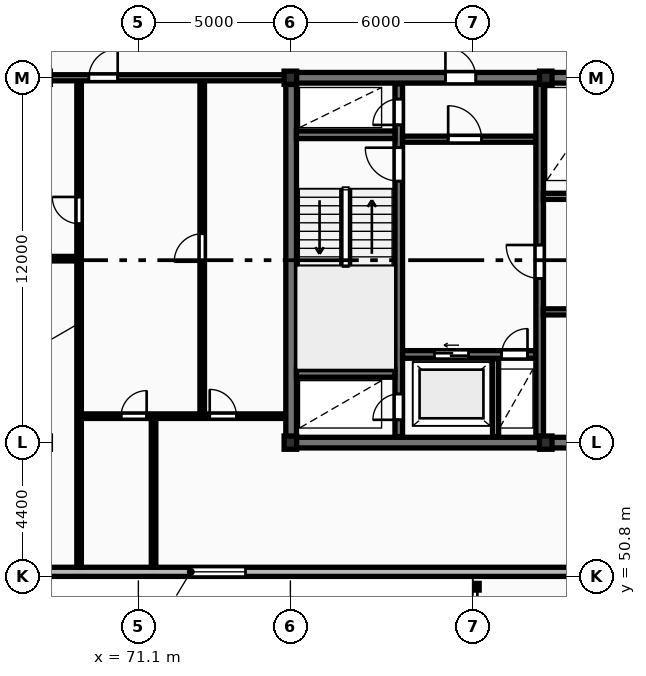
"""IFC4 building model, lengths in metres.
Left out: names, types, materials, properties, quantities, classifications, styles, units other than length and angle.
Written with IfcOpenShell. Run it as: python <this file> out.ifc"""

import sys

from ifc_helpers import new_model, si_unit, direction, frame, frame_2d, origin, origin_2d, place, context, subcontext, project, spatial, rectangle, i_section, extrude, element, fill, save


model = new_model("IFC4")
c1 = context("Model", 3, precision=1e-05, world=origin(), true_north=direction((0.0, 1.0)))
c2 = subcontext(c1, "Body", "Model", "MODEL_VIEW")
j1 = project(units=[si_unit("LENGTHUNIT", "METRE"), si_unit("PLANEANGLEUNIT", "RADIAN")], contexts=[c1])
p1 = place(None, origin())
s1 = spatial("IfcSite", under=j1, at=p1, CompositionType="ELEMENT")
p2 = place(p1, origin())
s2 = spatial("IfcBuilding", under=s1, at=p2, CompositionType="ELEMENT")
p3 = place(p2, frame((0.0, 0.0, 146.5)))
s3 = spatial("IfcBuildingStorey", under=s2, at=p3, CompositionType="ELEMENT", Elevation=146.5)
for number, where, z_axis, x_axis in (
    (1, (76.1, 55.2, 0.0), (0.0, 0.0, 1.0), (1.0, 0.0, 0.0)),
    (2, (76.1, 67.2, 0.0), (0.0, 0.0, 1.0), (1.0, 0.0, 0.0)),
    (3, (84.5, 55.2, 0.0), (0.0, 0.0, 1.0), (1.0, 0.0, 0.0)),
    (4, (84.5, 67.2, 0.0), (0.0, 0.0, 1.0), (1.0, 0.0, 0.0)),
):
    element("IfcColumn", number, at=place(p3, frame(where, z_axis=z_axis, x_axis=x_axis)), inside=s3, PredefinedType="COLUMN", context=c2, shape_type="SweptSolid", body=[
        extrude(i_section(OverallWidth=0.412, OverallDepth=0.437, WebThickness=0.036, FlangeThickness=0.052, FilletRadius=0.015, at=origin_2d()), origin(), (0.0, 0.0, 1.0), 3.6),
    ])
p4 = place(p3, frame((57.6, 50.95, 0.0), z_axis=(0.0, 0.0, 1.0), x_axis=(1.0, 0.0, 0.0)))
e5 = element("IfcWall", 5, at=p4, inside=s3, PredefinedType="STANDARD", context=c2, shape_type="SweptSolid", body=[
    extrude(rectangle(XDim=73.0, YDim=0.3, at=frame_2d((36.5, 0.0))), origin(), (0.0, 0.0, 1.0), 3.31),
])
p5 = place(p4, frame((15.225, 0.0, 0.85)))
e6 = element("IfcOpeningElement", 6, at=p5, cuts=e5, PredefinedType="OPENING", context=c2, shape_type="SweptSolid", body=[
    extrude(rectangle(XDim=1.8, YDim=1.8, at=frame_2d((0.9, 0.9))), frame((0.0, 0.16, 0.0), z_axis=(0.0, -1.0, 0.0), x_axis=(1.0, 0.0, 0.0)), (0.0, 0.0, 1.0), 0.32),
])
p6 = place(p4, frame((58.575, 0.0, 0.85)))
e7 = element("IfcOpeningElement", 7, at=p6, cuts=e5, PredefinedType="OPENING", context=c2, shape_type="SweptSolid", body=[
    extrude(rectangle(XDim=1.8, YDim=1.8, at=frame_2d((0.9, 0.9))), frame((0.0, 0.16, 0.0), z_axis=(0.0, -1.0, 0.0), x_axis=(1.0, 0.0, 0.0)), (0.0, 0.0, 1.0), 0.32),
])
p7 = place(p4, frame((33.45, 0.0, 0.0)))
e8 = element("IfcOpeningElement", 8, at=p7, cuts=e5, PredefinedType="OPENING", context=c2, shape_type="SweptSolid", body=[
    extrude(rectangle(XDim=1.1, YDim=2.1, at=frame_2d((0.55, 1.05))), frame((0.0, 0.16, 0.0), z_axis=(0.0, -1.0, 0.0), x_axis=(1.0, 0.0, 0.0)), (0.0, 0.0, 1.0), 0.32),
])
p8 = place(p3, frame((75.95, 55.2, 0.0), z_axis=(0.0, 0.0, 1.0), x_axis=(1.0, 0.0, 0.0)))
e9 = element("IfcWall", 9, at=p8, inside=s3, PredefinedType="SHEAR", context=c2, shape_type="SweptSolid", body=[
    extrude(rectangle(XDim=36.3, YDim=0.35, at=frame_2d((18.15, 0.0))), origin(), (0.0, 0.0, 1.0), 3.6),
])
p9 = place(p8, frame((15.1, 0.0, 0.0)))
e10 = element("IfcOpeningElement", 10, at=p9, cuts=e9, PredefinedType="OPENING", context=c2, shape_type="SweptSolid", body=[
    extrude(rectangle(XDim=1.1, YDim=2.1, at=frame_2d((0.55, 1.05))), frame((0.0, 0.185, 0.0), z_axis=(0.0, -1.0, 0.0), x_axis=(1.0, 0.0, 0.0)), (0.0, 0.0, 1.0), 0.37),
])
p10 = place(p3, frame((76.125, 55.375, 0.0), z_axis=(0.0, 0.0, 1.0), x_axis=(0.0, 1.0, 0.0)))
e11 = element("IfcWall", 11, at=p10, inside=s3, PredefinedType="SHEAR", context=c2, shape_type="SweptSolid", body=[
    extrude(rectangle(XDim=11.65, YDim=0.35, at=frame_2d((5.825, 0.0))), origin(), (0.0, 0.0, 1.0), 3.6),
])
p11 = place(p3, frame((75.95, 67.2, 0.0), z_axis=(0.0, 0.0, 1.0), x_axis=(1.0, 0.0, 0.0)))
e12 = element("IfcWall", 12, at=p11, inside=s3, PredefinedType="SHEAR", context=c2, shape_type="SweptSolid", body=[
    extrude(rectangle(XDim=36.3, YDim=0.35, at=frame_2d((18.15, 0.0))), origin(), (0.0, 0.0, 1.0), 3.6),
])
p12 = place(p11, frame((5.25, 0.0, 0.0)))
e13 = element("IfcOpeningElement", 13, at=p12, cuts=e12, PredefinedType="OPENING", context=c2, shape_type="SweptSolid", body=[
    extrude(rectangle(XDim=1.0, YDim=2.15, at=frame_2d((0.5, 1.075))), frame((0.0, 0.185, 0.0), z_axis=(0.0, -1.0, 0.0), x_axis=(1.0, 0.0, 0.0)), (0.0, 0.0, 1.0), 0.37),
])
p13 = place(p11, frame((21.6, 0.0, 0.0)))
e14 = element("IfcOpeningElement", 14, at=p13, cuts=e12, PredefinedType="OPENING", context=c2, shape_type="SweptSolid", body=[
    extrude(rectangle(XDim=1.5, YDim=2.2, at=frame_2d((0.75, 1.1))), frame((0.0, 0.185, 0.0), z_axis=(0.0, -1.0, 0.0), x_axis=(1.0, 0.0, 0.0)), (0.0, 0.0, 1.0), 0.37),
])
p14 = place(p11, frame((30.45, 0.0, 0.0)))
e15 = element("IfcOpeningElement", 15, at=p14, cuts=e12, PredefinedType="OPENING", context=c2, shape_type="SweptSolid", body=[
    extrude(rectangle(XDim=1.0, YDim=2.15, at=frame_2d((0.5, 1.075))), frame((0.0, 0.185, 0.0), z_axis=(0.0, -1.0, 0.0), x_axis=(1.0, 0.0, 0.0)), (0.0, 0.0, 1.0), 0.37),
])
p15 = place(p3, frame((79.665, 55.4, 0.0), z_axis=(0.0, 0.0, 1.0), x_axis=(0.0, 1.0, 0.0)))
e16 = element("IfcWall", 16, at=p15, inside=s3, PredefinedType="SHEAR", context=c2, shape_type="SweptSolid", body=[
    extrude(rectangle(XDim=11.6, YDim=0.25, at=frame_2d((5.8, 0.0))), origin(), (0.0, 0.0, 1.0), 3.6),
])
p16 = place(p15, frame((0.55, 0.0, 0.0)))
e17 = element("IfcOpeningElement", 17, at=p16, cuts=e16, PredefinedType="OPENING", context=c2, shape_type="SweptSolid", body=[
    extrude(rectangle(XDim=0.85, YDim=2.05, at=frame_2d((0.425, 1.025))), frame((0.0, 0.135, 0.0), z_axis=(0.0, -1.0, 0.0), x_axis=(1.0, 0.0, 0.0)), (0.0, 0.0, 1.0), 0.27),
])
p17 = place(p15, frame((8.4, 0.0, 0.0)))
e18 = element("IfcOpeningElement", 18, at=p17, cuts=e16, PredefinedType="OPENING", context=c2, shape_type="SweptSolid", body=[
    extrude(rectangle(XDim=1.1, YDim=2.1, at=frame_2d((0.55, 1.05))), frame((0.0, 0.135, 0.0), z_axis=(0.0, -1.0, 0.0), x_axis=(1.0, 0.0, 0.0)), (0.0, 0.0, 1.0), 0.27),
])
p18 = place(p15, frame((10.25, 0.0, 0.0)))
e19 = element("IfcOpeningElement", 19, at=p18, cuts=e16, PredefinedType="OPENING", context=c2, shape_type="SweptSolid", body=[
    extrude(rectangle(XDim=0.85, YDim=2.05, at=frame_2d((0.425, 1.025))), frame((0.0, 0.135, 0.0), z_axis=(0.0, -1.0, 0.0), x_axis=(1.0, 0.0, 0.0)), (0.0, 0.0, 1.0), 0.27),
])
for number, where, z_axis, x_axis in (
    (20, (76.3, 57.475, 0.0), (0.0, 0.0, 1.0), (1.0, 0.0, 0.0)),
    (21, (76.3, 65.325, 0.0), (0.0, 0.0, 1.0), (1.0, 0.0, 0.0)),
):
    element("IfcWall", number, at=place(p3, frame(where, z_axis=z_axis, x_axis=x_axis)), inside=s3, PredefinedType="SHEAR", context=c2, shape_type="SweptSolid", body=[
        extrude(rectangle(XDim=3.24, YDim=0.25, at=frame_2d((1.62, 0.0))), origin(), (0.0, 0.0, 1.0), 3.6),
    ])
p19 = place(p3, frame((79.79, 58.1, 0.0), z_axis=(0.0, 0.0, 1.0), x_axis=(1.0, 0.0, 0.0)))
e22 = element("IfcWall", 22, at=p19, inside=s3, PredefinedType="SHEAR", context=c2, shape_type="SweptSolid", body=[
    extrude(rectangle(XDim=4.39, YDim=0.25, at=frame_2d((2.195, 0.0))), origin(), (0.0, 0.0, 1.0), 3.6),
])
p20 = place(p19, frame((1.05, 0.0, 0.0)))
e23 = element("IfcOpeningElement", 23, at=p20, cuts=e22, PredefinedType="OPENING", context=c2, shape_type="SweptSolid", body=[
    extrude(rectangle(XDim=1.12, YDim=2.12, at=frame_2d((0.56, 1.06))), frame((0.0, 0.135, 0.0), z_axis=(0.0, -1.0, 0.0), x_axis=(1.0, 0.0, 0.0)), (0.0, 0.0, 1.0), 0.27),
])
p21 = place(p19, frame((3.26, 0.0, 0.0)))
e24 = element("IfcOpeningElement", 24, at=p21, cuts=e22, PredefinedType="OPENING", context=c2, shape_type="SweptSolid", body=[
    extrude(rectangle(XDim=0.85, YDim=2.05, at=frame_2d((0.425, 1.025))), frame((0.0, 0.135, 0.0), z_axis=(0.0, -1.0, 0.0), x_axis=(1.0, 0.0, 0.0)), (0.0, 0.0, 1.0), 0.27),
])
p22 = place(p3, frame((82.85, 55.4, 0.0), z_axis=(0.0, 0.0, 1.0), x_axis=(0.0, 1.0, 0.0)))
e25 = element("IfcWall", 25, at=p22, inside=s3, PredefinedType="PARTITIONING", context=c2, shape_type="SweptSolid", body=[
    extrude(rectangle(XDim=2.56, YDim=0.2, at=frame_2d((1.28, 0.0))), origin(), (0.0, 0.0, 1.0), 3.31),
])
p23 = place(p3, frame((79.79, 65.18, 0.0), z_axis=(0.0, 0.0, 1.0), x_axis=(1.0, 0.0, 0.0)))
e26 = element("IfcWall", 26, at=p23, inside=s3, PredefinedType="PARTITIONING", context=c2, shape_type="SweptSolid", body=[
    extrude(rectangle(XDim=4.39, YDim=0.2, at=frame_2d((2.195, 0.0))), origin(), (0.0, 0.0, 1.0), 3.31),
])
p24 = place(p23, frame((1.5, 0.0, 0.0)))
e27 = element("IfcOpeningElement", 27, at=p24, cuts=e26, PredefinedType="OPENING", context=c2, shape_type="SweptSolid", body=[
    extrude(rectangle(XDim=1.1, YDim=2.1, at=frame_2d((0.55, 1.05))), frame((0.0, 0.11, 0.0), z_axis=(0.0, -1.0, 0.0), x_axis=(1.0, 0.0, 0.0)), (0.0, 0.0, 1.0), 0.22),
])
p25 = place(p3, frame((84.3, 55.4, 0.0), z_axis=(0.0, 0.0, 1.0), x_axis=(0.0, 1.0, 0.0)))
e28 = element("IfcWall", 28, at=p25, inside=s3, PredefinedType="SHEAR", context=c2, shape_type="SweptSolid", body=[
    extrude(rectangle(XDim=11.6, YDim=0.25, at=frame_2d((5.8, 0.0))), origin(), (0.0, 0.0, 1.0), 3.6),
])
p26 = place(p25, frame((5.2, 0.0, 0.0)))
e29 = element("IfcOpeningElement", 29, at=p26, cuts=e28, PredefinedType="OPENING", context=c2, shape_type="SweptSolid", body=[
    extrude(rectangle(XDim=1.1, YDim=2.1, at=frame_2d((0.55, 1.05))), frame((0.0, 0.135, 0.0), z_axis=(0.0, -1.0, 0.0), x_axis=(1.0, 0.0, 0.0)), (0.0, 0.0, 1.0), 0.27),
])
p27 = place(p3, frame((84.42, 59.5, 0.0), z_axis=(0.0, 0.0, 1.0), x_axis=(1.0, 0.0, 0.0)))
e30 = element("IfcWall", 30, at=p27, inside=s3, PredefinedType="PARTITIONING", context=c2, shape_type="SweptSolid", body=[
    extrude(rectangle(XDim=8.36, YDim=0.2, at=frame_2d((4.18, 0.0))), origin(), (0.0, 0.0, 1.0), 3.31),
])
p28 = place(p27, frame((2.1, 0.0, 0.0)))
e31 = element("IfcOpeningElement", 31, at=p28, cuts=e30, PredefinedType="OPENING", context=c2, shape_type="SweptSolid", body=[
    extrude(rectangle(XDim=0.92, YDim=2.08, at=frame_2d((0.46, 1.04))), frame((0.0, 0.11, 0.0), z_axis=(0.0, -1.0, 0.0), x_axis=(1.0, 0.0, 0.0)), (0.0, 0.0, 1.0), 0.22),
])
p29 = place(p27, frame((6.38, 0.0, 0.0)))
e32 = element("IfcOpeningElement", 32, at=p29, cuts=e30, PredefinedType="OPENING", context=c2, shape_type="SweptSolid", body=[
    extrude(rectangle(XDim=1.1, YDim=2.1, at=frame_2d((0.55, 1.05))), frame((0.0, 0.11, 0.0), z_axis=(0.0, -1.0, 0.0), x_axis=(1.0, 0.0, 0.0)), (0.0, 0.0, 1.0), 0.22),
])
p30 = place(p3, frame((84.42, 63.3, 0.0), z_axis=(0.0, 0.0, 1.0), x_axis=(1.0, 0.0, 0.0)))
e33 = element("IfcWall", 33, at=p30, inside=s3, PredefinedType="PARTITIONING", context=c2, shape_type="SweptSolid", body=[
    extrude(rectangle(XDim=19.83, YDim=0.2, at=frame_2d((9.915, 0.0))), origin(), (0.0, 0.0, 1.0), 3.31),
])
p31 = place(p30, frame((1.15, 0.0, 0.0)))
e34 = element("IfcOpeningElement", 34, at=p31, cuts=e33, PredefinedType="OPENING", context=c2, shape_type="SweptSolid", body=[
    extrude(rectangle(XDim=0.85, YDim=2.05, at=frame_2d((0.425, 1.025))), frame((0.0, 0.11, 0.0), z_axis=(0.0, -1.0, 0.0), x_axis=(1.0, 0.0, 0.0)), (0.0, 0.0, 1.0), 0.22),
])
p32 = place(p30, frame((3.25, 0.0, 0.0)))
e35 = element("IfcOpeningElement", 35, at=p32, cuts=e33, PredefinedType="OPENING", context=c2, shape_type="SweptSolid", body=[
    extrude(rectangle(XDim=0.85, YDim=2.05, at=frame_2d((0.425, 1.025))), frame((0.0, 0.11, 0.0), z_axis=(0.0, -1.0, 0.0), x_axis=(1.0, 0.0, 0.0)), (0.0, 0.0, 1.0), 0.22),
])
p33 = place(p30, frame((13.08, 0.0, 0.0)))
e36 = element("IfcOpeningElement", 36, at=p33, cuts=e33, PredefinedType="OPENING", context=c2, shape_type="SweptSolid", body=[
    extrude(rectangle(XDim=1.5, YDim=2.2, at=frame_2d((0.75, 1.1))), frame((0.0, 0.11, 0.0), z_axis=(0.0, -1.0, 0.0), x_axis=(1.0, 0.0, 0.0)), (0.0, 0.0, 1.0), 0.22),
])
p34 = place(p30, frame((6.78, 0.0, 0.0)))
e37 = element("IfcOpeningElement", 37, at=p34, cuts=e33, PredefinedType="OPENING", context=c2, shape_type="SweptSolid", body=[
    extrude(rectangle(XDim=0.92, YDim=2.08, at=frame_2d((0.46, 1.04))), frame((0.0, 0.11, 0.0), z_axis=(0.0, -1.0, 0.0), x_axis=(1.0, 0.0, 0.0)), (0.0, 0.0, 1.0), 0.22),
])
p35 = place(p30, frame((16.28, 0.0, 0.0)))
e38 = element("IfcOpeningElement", 38, at=p35, cuts=e33, PredefinedType="OPENING", context=c2, shape_type="SweptSolid", body=[
    extrude(rectangle(XDim=0.92, YDim=2.08, at=frame_2d((0.46, 1.04))), frame((0.0, 0.11, 0.0), z_axis=(0.0, -1.0, 0.0), x_axis=(1.0, 0.0, 0.0)), (0.0, 0.0, 1.0), 0.22),
])
p36 = place(p3, frame((57.6, 61.25, 0.0), z_axis=(0.0, 0.0, 1.0), x_axis=(1.0, 0.0, 0.0)))
e39 = element("IfcWall", 39, at=p36, inside=s3, PredefinedType="PARTITIONING", context=c2, shape_type="SweptSolid", body=[
    extrude(rectangle(XDim=11.55, YDim=0.15, at=frame_2d((5.775, 0.0))), origin(), (0.0, 0.0, 1.0), 3.31),
])
p37 = place(p36, frame((5.355, 0.0, 0.0)))
e40 = element("IfcOpeningElement", 40, at=p37, cuts=e39, PredefinedType="OPENING", context=c2, shape_type="SweptSolid", body=[
    extrude(rectangle(XDim=0.84, YDim=2.04, at=frame_2d((0.42, 1.02))), frame((0.0, 0.085, 0.0), z_axis=(0.0, -1.0, 0.0), x_axis=(1.0, 0.0, 0.0)), (0.0, 0.0, 1.0), 0.17),
])
p38 = place(p3, frame((69.15, 51.1, 0.0), z_axis=(0.0, 0.0, 1.0), x_axis=(0.0, 1.0, 0.0)))
e41 = element("IfcWall", 41, at=p38, inside=s3, PredefinedType="PARTITIONING", context=c2, shape_type="SweptSolid", body=[
    extrude(rectangle(XDim=16.05, YDim=0.15, at=frame_2d((8.025, 0.0))), origin(), (0.0, 0.0, 1.0), 3.31),
])
p39 = place(p38, frame((11.3, 0.0, 0.0)))
e42 = element("IfcOpeningElement", 42, at=p39, cuts=e41, PredefinedType="OPENING", context=c2, shape_type="SweptSolid", body=[
    extrude(rectangle(XDim=0.88, YDim=2.06, at=frame_2d((0.44, 1.03))), frame((0.0, 0.085, 0.0), z_axis=(0.0, -1.0, 0.0), x_axis=(1.0, 0.0, 0.0)), (0.0, 0.0, 1.0), 0.17),
])
p40 = place(p3, frame((73.2, 56.07, 0.0), z_axis=(0.0, 0.0, 1.0), x_axis=(0.0, 1.0, 0.0)))
e43 = element("IfcWall", 43, at=p40, inside=s3, PredefinedType="PARTITIONING", context=c2, shape_type="SweptSolid", body=[
    extrude(rectangle(XDim=11.08, YDim=0.15, at=frame_2d((5.54, 0.0))), origin(), (0.0, 0.0, 1.0), 3.31),
])
p41 = place(p40, frame((5.08, 0.0, 0.0)))
e44 = element("IfcOpeningElement", 44, at=p41, cuts=e43, PredefinedType="OPENING", context=c2, shape_type="SweptSolid", body=[
    extrude(rectangle(XDim=0.92, YDim=2.08, at=frame_2d((0.46, 1.04))), frame((0.0, 0.085, 0.0), z_axis=(0.0, -1.0, 0.0), x_axis=(1.0, 0.0, 0.0)), (0.0, 0.0, 1.0), 0.17),
])
p42 = place(p3, frame((71.6, 51.1, 0.0), z_axis=(0.0, 0.0, 1.0), x_axis=(0.0, 1.0, 0.0)))
e45 = element("IfcWall", 45, at=p42, inside=s3, PredefinedType="PARTITIONING", context=c2, shape_type="SweptSolid", body=[
    extrude(rectangle(XDim=4.97, YDim=0.15, at=frame_2d((2.485, 0.0))), origin(), (0.0, 0.0, 1.0), 3.31),
])
p43 = place(p3, frame((69.17, 56.07, 0.0), z_axis=(0.0, 0.0, 1.0), x_axis=(1.0, 0.0, 0.0)))
e46 = element("IfcWall", 46, at=p43, inside=s3, PredefinedType="PARTITIONING", context=c2, shape_type="SweptSolid", body=[
    extrude(rectangle(XDim=6.76, YDim=0.15, at=frame_2d((3.38, 0.0))), origin(), (0.0, 0.0, 1.0), 3.31),
])
p44 = place(p43, frame((1.362, 0.0, 0.0)))
e47 = element("IfcOpeningElement", 47, at=p44, cuts=e46, PredefinedType="OPENING", context=c2, shape_type="SweptSolid", body=[
    extrude(rectangle(XDim=0.84, YDim=2.04, at=frame_2d((0.42, 1.02))), frame((0.0, 0.085, 0.0), z_axis=(0.0, -1.0, 0.0), x_axis=(1.0, 0.0, 0.0)), (0.0, 0.0, 1.0), 0.17),
])
p45 = place(p43, frame((4.277, 0.0, 0.0)))
e48 = element("IfcOpeningElement", 48, at=p45, cuts=e46, PredefinedType="OPENING", context=c2, shape_type="SweptSolid", body=[
    extrude(rectangle(XDim=0.88, YDim=2.06, at=frame_2d((0.44, 1.03))), frame((0.0, 0.085, 0.0), z_axis=(0.0, -1.0, 0.0), x_axis=(1.0, 0.0, 0.0)), (0.0, 0.0, 1.0), 0.17),
])
p46 = place(p3, frame((57.6, 67.2, 0.0), z_axis=(0.0, 0.0, 1.0), x_axis=(1.0, 0.0, 0.0)))
e49 = element("IfcWall", 49, at=p46, inside=s3, PredefinedType="PARTITIONING", context=c2, shape_type="SweptSolid", body=[
    extrude(rectangle(XDim=18.35, YDim=0.2, at=frame_2d((9.175, 0.0))), origin(), (0.0, 0.0, 1.0), 2.773),
])
p47 = place(p46, frame((11.87, 0.0, 0.0)))
e50 = element("IfcOpeningElement", 50, at=p47, cuts=e49, PredefinedType="OPENING", context=c2, shape_type="SweptSolid", body=[
    extrude(rectangle(XDim=0.95, YDim=2.15, at=frame_2d((0.475, 1.075))), frame((0.0, 0.11, 0.0), z_axis=(0.0, -1.0, 0.0), x_axis=(1.0, 0.0, 0.0)), (0.0, 0.0, 1.0), 0.22),
])
p48 = place(p5, origin())
e51 = element("IfcWindow", 51, at=p48, inside=s3, PartitioningType="SINGLE_PANEL", PredefinedType="WINDOW", context=c2, shape_type="SweptSolid", body=[
    extrude(rectangle(XDim=1.8, YDim=1.8, at=frame_2d((0.9, 0.9))), frame((0.0, 0.03, 0.0), z_axis=(0.0, -1.0, 0.0), x_axis=(1.0, 0.0, 0.0)), (0.0, 0.0, 1.0), 0.06),
])
fill(e6, e51)
p49 = place(p12, origin())
e52 = element("IfcDoor", 52, at=p49, inside=s3, OperationType="SINGLE_SWING_LEFT", PredefinedType="DOOR", context=c2, shape_type="SweptSolid", body=[
    extrude(rectangle(XDim=1.0, YDim=2.15, at=frame_2d((0.5, 1.075))), frame((0.0, 0.025, 0.0), z_axis=(0.0, -1.0, 0.0), x_axis=(1.0, 0.0, 0.0)), (0.0, 0.0, 1.0), 0.05),
])
fill(e13, e52)
p50 = place(p16, origin())
e53 = element("IfcDoor", 53, at=p50, inside=s3, OperationType="SINGLE_SWING_LEFT", PredefinedType="DOOR", context=c2, shape_type="SweptSolid", body=[
    extrude(rectangle(XDim=0.85, YDim=2.05, at=frame_2d((0.425, 1.025))), frame((0.0, 0.025, 0.0), z_axis=(0.0, -1.0, 0.0), x_axis=(1.0, 0.0, 0.0)), (0.0, 0.0, 1.0), 0.05),
])
fill(e17, e53)
p51 = place(p17, origin())
e54 = element("IfcDoor", 54, at=p51, inside=s3, OperationType="SINGLE_SWING_RIGHT", PredefinedType="DOOR", context=c2, shape_type="SweptSolid", body=[
    extrude(rectangle(XDim=1.1, YDim=2.1, at=frame_2d((0.55, 1.05))), frame((0.0, 0.025, 0.0), z_axis=(0.0, -1.0, 0.0), x_axis=(1.0, 0.0, 0.0)), (0.0, 0.0, 1.0), 0.05),
])
fill(e18, e54)
p52 = place(p18, origin())
e55 = element("IfcDoor", 55, at=p52, inside=s3, OperationType="SINGLE_SWING_LEFT", PredefinedType="DOOR", context=c2, shape_type="SweptSolid", body=[
    extrude(rectangle(XDim=0.85, YDim=2.05, at=frame_2d((0.425, 1.025))), frame((0.0, 0.025, 0.0), z_axis=(0.0, -1.0, 0.0), x_axis=(1.0, 0.0, 0.0)), (0.0, 0.0, 1.0), 0.05),
])
fill(e19, e55)
p53 = place(p20, origin())
e56 = element("IfcDoor", 56, at=p53, inside=s3, OperationType="SLIDING_TO_LEFT", PredefinedType="DOOR", context=c2, shape_type="SweptSolid", body=[
    extrude(rectangle(XDim=1.12, YDim=2.12, at=frame_2d((0.56, 1.06))), frame((0.0, 0.025, 0.0), z_axis=(0.0, -1.0, 0.0), x_axis=(1.0, 0.0, 0.0)), (0.0, 0.0, 1.0), 0.05),
])
fill(e23, e56)
p54 = place(p21, origin())
e57 = element("IfcDoor", 57, at=p54, inside=s3, OperationType="SINGLE_SWING_RIGHT", PredefinedType="DOOR", context=c2, shape_type="SweptSolid", body=[
    extrude(rectangle(XDim=0.85, YDim=2.05, at=frame_2d((0.425, 1.025))), frame((0.0, 0.025, 0.0), z_axis=(0.0, -1.0, 0.0), x_axis=(1.0, 0.0, 0.0)), (0.0, 0.0, 1.0), 0.05),
])
fill(e24, e57)
p55 = place(p24, origin())
e58 = element("IfcDoor", 58, at=p55, inside=s3, OperationType="SINGLE_SWING_LEFT", PredefinedType="DOOR", context=c2, shape_type="SweptSolid", body=[
    extrude(rectangle(XDim=1.1, YDim=2.1, at=frame_2d((0.55, 1.05))), frame((0.0, 0.025, 0.0), z_axis=(0.0, -1.0, 0.0), x_axis=(1.0, 0.0, 0.0)), (0.0, 0.0, 1.0), 0.05),
])
fill(e27, e58)
p56 = place(p26, origin())
e59 = element("IfcDoor", 59, at=p56, inside=s3, OperationType="SINGLE_SWING_RIGHT", PredefinedType="DOOR", context=c2, shape_type="SweptSolid", body=[
    extrude(rectangle(XDim=1.1, YDim=2.1, at=frame_2d((0.55, 1.05))), frame((0.0, 0.025, 0.0), z_axis=(0.0, -1.0, 0.0), x_axis=(1.0, 0.0, 0.0)), (0.0, 0.0, 1.0), 0.05),
])
fill(e29, e59)
p57 = place(p39, origin())
e60 = element("IfcDoor", 60, at=p57, inside=s3, OperationType="SINGLE_SWING_RIGHT", PredefinedType="DOOR", context=c2, shape_type="SweptSolid", body=[
    extrude(rectangle(XDim=0.88, YDim=2.06, at=frame_2d((0.44, 1.03))), frame((0.0, 0.025, 0.0), z_axis=(0.0, -1.0, 0.0), x_axis=(1.0, 0.0, 0.0)), (0.0, 0.0, 1.0), 0.05),
])
fill(e42, e60)
p58 = place(p41, origin())
e61 = element("IfcDoor", 61, at=p58, inside=s3, OperationType="SINGLE_SWING_LEFT", PredefinedType="DOOR", context=c2, shape_type="SweptSolid", body=[
    extrude(rectangle(XDim=0.92, YDim=2.08, at=frame_2d((0.46, 1.04))), frame((0.0, 0.025, 0.0), z_axis=(0.0, -1.0, 0.0), x_axis=(1.0, 0.0, 0.0)), (0.0, 0.0, 1.0), 0.05),
])
fill(e44, e61)
p59 = place(p44, origin())
e62 = element("IfcDoor", 62, at=p59, inside=s3, OperationType="SINGLE_SWING_RIGHT", PredefinedType="DOOR", context=c2, shape_type="SweptSolid", body=[
    extrude(rectangle(XDim=0.84, YDim=2.04, at=frame_2d((0.42, 1.02))), frame((0.0, 0.025, 0.0), z_axis=(0.0, -1.0, 0.0), x_axis=(1.0, 0.0, 0.0)), (0.0, 0.0, 1.0), 0.05),
])
fill(e47, e62)
p60 = place(p45, origin())
e63 = element("IfcDoor", 63, at=p60, inside=s3, OperationType="SINGLE_SWING_LEFT", PredefinedType="DOOR", context=c2, shape_type="SweptSolid", body=[
    extrude(rectangle(XDim=0.88, YDim=2.06, at=frame_2d((0.44, 1.03))), frame((0.0, 0.025, 0.0), z_axis=(0.0, -1.0, 0.0), x_axis=(1.0, 0.0, 0.0)), (0.0, 0.0, 1.0), 0.05),
])
fill(e48, e63)
p61 = place(p47, origin())
e64 = element("IfcDoor", 64, at=p61, inside=s3, OperationType="SINGLE_SWING_RIGHT", PredefinedType="DOOR", context=c2, shape_type="SweptSolid", body=[
    extrude(rectangle(XDim=0.95, YDim=2.15, at=frame_2d((0.475, 1.075))), frame((0.0, 0.025, 0.0), z_axis=(0.0, -1.0, 0.0), x_axis=(1.0, 0.0, 0.0)), (0.0, 0.0, 1.0), 0.05),
])
fill(e50, e64)
save(model, sys.argv[1])
